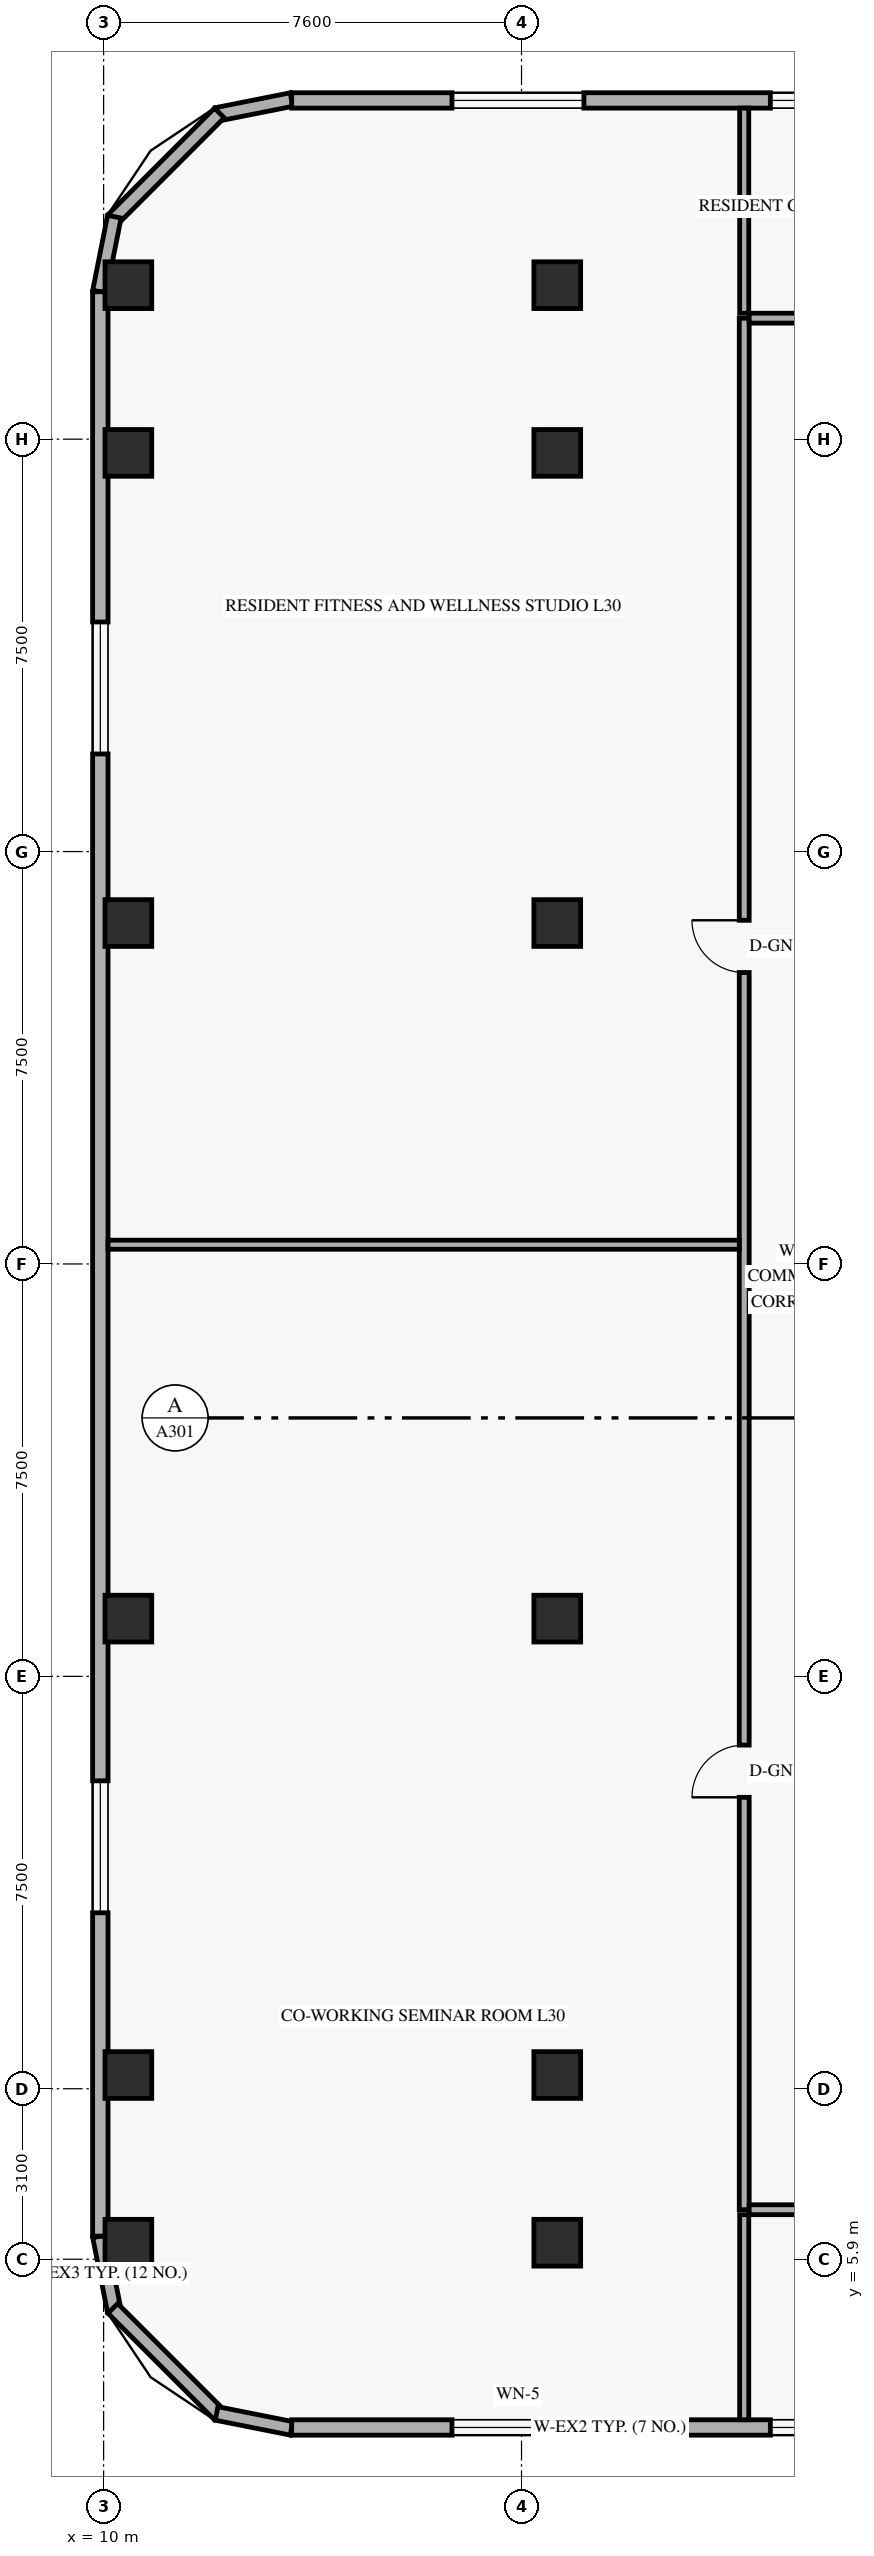
"""IFC4 building model, lengths in metres.
Left out: names, types, materials, properties, quantities, classifications, styles, units other than length and angle.
Written with IfcOpenShell. Run it as: python <this file> out.ifc"""

import sys

from ifc_helpers import new_model, si_unit, direction, frame, frame_2d, origin, origin_2d, place, context, subcontext, project, spatial, rectangle, extrude, element, fill, save


model = new_model("IFC4")
c1 = context("Model", 3, precision=1e-05, world=origin(), true_north=direction((0.0, 1.0)))
c2 = subcontext(c1, "Body", "Model", "MODEL_VIEW")
j1 = project(units=[si_unit("LENGTHUNIT", "METRE"), si_unit("PLANEANGLEUNIT", "RADIAN")], contexts=[c1])
p1 = place(None, origin())
s1 = spatial("IfcSite", under=j1, at=p1, CompositionType="ELEMENT")
p2 = place(p1, origin())
s2 = spatial("IfcBuilding", under=s1, at=p2, CompositionType="ELEMENT")
p3 = place(p2, frame((0.0, 0.0, 117.0)))
s3 = spatial("IfcBuildingStorey", under=s2, at=p3, CompositionType="ELEMENT", Elevation=117.0)
for number, where, z_axis, x_axis in (
    (1, (10.45, 6.2, 0.0), (0.0, 0.0, 1.0), (1.0, 0.0, 0.0)),
    (2, (10.45, 9.25, 0.0), (0.0, 0.0, 1.0), (1.0, 0.0, 0.0)),
    (3, (10.45, 17.55, 0.0), (0.0, 0.0, 1.0), (1.0, 0.0, 0.0)),
    (4, (10.45, 30.2, 0.0), (0.0, 0.0, 1.0), (1.0, 0.0, 0.0)),
    (5, (10.45, 38.75, 0.0), (0.0, 0.0, 1.0), (1.0, 0.0, 0.0)),
    (6, (10.45, 41.8, 0.0), (0.0, 0.0, 1.0), (1.0, 0.0, 0.0)),
    (7, (18.25, 6.2, 0.0), (0.0, 0.0, 1.0), (1.0, 0.0, 0.0)),
    (8, (18.25, 9.25, 0.0), (0.0, 0.0, 1.0), (1.0, 0.0, 0.0)),
    (9, (18.25, 17.55, 0.0), (0.0, 0.0, 1.0), (1.0, 0.0, 0.0)),
    (10, (18.25, 30.2, 0.0), (0.0, 0.0, 1.0), (1.0, 0.0, 0.0)),
    (11, (18.25, 38.75, 0.0), (0.0, 0.0, 1.0), (1.0, 0.0, 0.0)),
    (12, (18.25, 41.8, 0.0), (0.0, 0.0, 1.0), (1.0, 0.0, 0.0)),
):
    element("IfcColumn", number, at=place(p3, frame(where, z_axis=z_axis, x_axis=x_axis)), inside=s3, PredefinedType="COLUMN", context=c2, shape_type="SweptSolid", body=[
        extrude(rectangle(XDim=0.85, YDim=0.85, at=origin_2d()), origin(), (0.0, 0.0, 1.0), 4.2),
    ])
p4 = place(p3, frame((9.924, 6.316, 0.0), z_axis=(0.0, 0.0, 1.0), x_axis=(0.195000137217, -0.980803214965, 0.0)))
e13 = element("IfcWall", 13, at=p4, inside=s3, PredefinedType="SOLIDWALL", context=c2, shape_type="SweptSolid", body=[
    extrude(rectangle(XDim=1.388, YDim=0.25, at=frame_2d((0.694, 0.0))), origin(), (0.0, 0.0, 1.0), 3.96),
])
p5 = place(p3, frame((10.168, 5.005, 0.0), z_axis=(0.0, 0.0, 1.0), x_axis=(0.707151344399, -0.707062215165, 0.0)))
e14 = element("IfcWall", 14, at=p5, inside=s3, PredefinedType="SOLIDWALL", context=c2, shape_type="SweptSolid", body=[
    extrude(rectangle(XDim=2.739, YDim=0.25, at=frame_2d((1.37, 0.0))), origin(), (0.0, 0.0, 1.0), 3.96),
])
for number, where, z_axis, x_axis in (
    (15, (12.054, 3.095, 0.0), (0.0, 0.0, 1.0), (0.981, -0.195, 0.0)),
    (16, (13.417, 45.176, 0.0), (0.0, 0.0, 1.0), (-0.981, -0.195, 0.0)),
):
    element("IfcWall", number, at=place(p3, frame(where, z_axis=z_axis, x_axis=x_axis)), inside=s3, PredefinedType="SOLIDWALL", context=c2, shape_type="SweptSolid", body=[
        extrude(rectangle(XDim=1.389, YDim=0.25, at=frame_2d((0.694, 0.0))), origin(), (0.0, 0.0, 1.0), 3.96),
    ])
p6 = place(p3, frame((12.105, 44.932, 0.0), z_axis=(0.0, 0.0, 1.0), x_axis=(-0.707151344399, -0.707062215165, 0.0)))
e17 = element("IfcWall", 17, at=p6, inside=s3, PredefinedType="SOLIDWALL", context=c2, shape_type="SweptSolid", body=[
    extrude(rectangle(XDim=2.739, YDim=0.25, at=frame_2d((1.37, 0.0))), origin(), (0.0, 0.0, 1.0), 3.96),
])
p7 = place(p3, frame((10.195, 43.045, 0.0), z_axis=(0.0, 0.0, 1.0), x_axis=(-0.195000137217, -0.980803214965, 0.0)))
e18 = element("IfcWall", 18, at=p7, inside=s3, PredefinedType="SOLIDWALL", context=c2, shape_type="SweptSolid", body=[
    extrude(rectangle(XDim=1.388, YDim=0.25, at=frame_2d((0.694, 0.0))), origin(), (0.0, 0.0, 1.0), 3.96),
])
p8 = place(p3, frame((13.42, 2.84, 0.0), z_axis=(0.0, 0.0, 1.0), x_axis=(1.0, 0.0, 0.0)))
e19 = element("IfcWall", 19, at=p8, inside=s3, PredefinedType="SOLIDWALL", context=c2, shape_type="SweptSolid", body=[
    extrude(rectangle(XDim=11.58, YDim=0.28, at=frame_2d((5.79, 0.0))), origin(), (0.0, 0.0, 1.0), 3.96),
])
p9 = place(p8, frame((2.915, 0.0, 0.85)))
e20 = element("IfcOpeningElement", 20, at=p9, cuts=e19, PredefinedType="OPENING", context=c2, shape_type="SweptSolid", body=[
    extrude(rectangle(XDim=2.4, YDim=1.9, at=frame_2d((1.2, 0.95))), frame((0.0, 0.15, 0.0), z_axis=(0.0, -1.0, 0.0), x_axis=(1.0, 0.0, 0.0)), (0.0, 0.0, 1.0), 0.3),
])
p10 = place(p8, frame((8.705, 0.0, 0.85)))
e21 = element("IfcOpeningElement", 21, at=p10, cuts=e19, PredefinedType="OPENING", context=c2, shape_type="SweptSolid", body=[
    extrude(rectangle(XDim=2.4, YDim=1.9, at=frame_2d((1.2, 0.95))), frame((0.0, 0.15, 0.0), z_axis=(0.0, -1.0, 0.0), x_axis=(1.0, 0.0, 0.0)), (0.0, 0.0, 1.0), 0.3),
])
p11 = place(p3, frame((25.0, 45.16, 0.0), z_axis=(0.0, 0.0, 1.0), x_axis=(-1.0, 0.0, 0.0)))
e22 = element("IfcWall", 22, at=p11, inside=s3, PredefinedType="SOLIDWALL", context=c2, shape_type="SweptSolid", body=[
    extrude(rectangle(XDim=11.58, YDim=0.28, at=frame_2d((5.79, 0.0))), origin(), (0.0, 0.0, 1.0), 3.96),
])
p12 = place(p11, frame((6.265, 0.0, 0.85)))
e23 = element("IfcOpeningElement", 23, at=p12, cuts=e22, PredefinedType="OPENING", context=c2, shape_type="SweptSolid", body=[
    extrude(rectangle(XDim=2.4, YDim=1.9, at=frame_2d((1.2, 0.95))), frame((0.0, 0.15, 0.0), z_axis=(0.0, -1.0, 0.0), x_axis=(1.0, 0.0, 0.0)), (0.0, 0.0, 1.0), 0.3),
])
p13 = place(p11, frame((0.475, 0.0, 0.85)))
e24 = element("IfcOpeningElement", 24, at=p13, cuts=e22, PredefinedType="OPENING", context=c2, shape_type="SweptSolid", body=[
    extrude(rectangle(XDim=2.4, YDim=1.9, at=frame_2d((1.2, 0.95))), frame((0.0, 0.15, 0.0), z_axis=(0.0, -1.0, 0.0), x_axis=(1.0, 0.0, 0.0)), (0.0, 0.0, 1.0), 0.3),
])
p14 = place(p3, frame((9.94, 41.68, 0.0), z_axis=(0.0, 0.0, 1.0), x_axis=(0.0, -1.0, 0.0)))
e25 = element("IfcWall", 25, at=p14, inside=s3, PredefinedType="SOLIDWALL", context=c2, shape_type="SweptSolid", body=[
    extrude(rectangle(XDim=35.36, YDim=0.28, at=frame_2d((17.68, 0.0))), origin(), (0.0, 0.0, 1.0), 3.96),
])
p15 = place(p14, frame((27.08, 0.0, 0.85)))
e26 = element("IfcOpeningElement", 26, at=p15, cuts=e25, PredefinedType="OPENING", context=c2, shape_type="SweptSolid", body=[
    extrude(rectangle(XDim=2.4, YDim=1.9, at=frame_2d((1.2, 0.95))), frame((0.0, 0.15, 0.0), z_axis=(0.0, -1.0, 0.0), x_axis=(1.0, 0.0, 0.0)), (0.0, 0.0, 1.0), 0.3),
])
p16 = place(p14, frame((6.005, 0.0, 0.85)))
e27 = element("IfcOpeningElement", 27, at=p16, cuts=e25, PredefinedType="OPENING", context=c2, shape_type="SweptSolid", body=[
    extrude(rectangle(XDim=2.4, YDim=1.9, at=frame_2d((1.2, 0.95))), frame((0.0, 0.15, 0.0), z_axis=(0.0, -1.0, 0.0), x_axis=(1.0, 0.0, 0.0)), (0.0, 0.0, 1.0), 0.3),
])
p17 = place(p3, frame((21.65, 6.8, 0.0), z_axis=(0.0, 0.0, 1.0), x_axis=(0.0, 1.0, 0.0)))
e28 = element("IfcWall", 28, at=p17, inside=s3, PredefinedType="STANDARD", context=c2, shape_type="SweptSolid", body=[
    extrude(rectangle(XDim=34.4, YDim=0.18, at=frame_2d((17.2, 0.0))), origin(), (0.0, 0.0, 1.0), 3.331),
])
p18 = place(p17, frame((7.5, 0.0, 0.0)))
e29 = element("IfcOpeningElement", 29, at=p18, cuts=e28, PredefinedType="OPENING", context=c2, shape_type="SweptSolid", body=[
    extrude(rectangle(XDim=0.95, YDim=2.15, at=frame_2d((0.475, 1.075))), frame((0.0, 0.1, 0.0), z_axis=(0.0, -1.0, 0.0), x_axis=(1.0, 0.0, 0.0)), (0.0, 0.0, 1.0), 0.2),
])
p19 = place(p17, frame((22.5, 0.0, 0.0)))
e30 = element("IfcOpeningElement", 30, at=p19, cuts=e28, PredefinedType="OPENING", context=c2, shape_type="SweptSolid", body=[
    extrude(rectangle(XDim=0.95, YDim=2.15, at=frame_2d((0.475, 1.075))), frame((0.0, 0.1, 0.0), z_axis=(0.0, -1.0, 0.0), x_axis=(1.0, 0.0, 0.0)), (0.0, 0.0, 1.0), 0.2),
])
p20 = place(p3, frame((21.74, 6.8, 0.0), z_axis=(0.0, 0.0, 1.0), x_axis=(1.0, 0.0, 0.0)))
e31 = element("IfcWall", 31, at=p20, inside=s3, PredefinedType="STANDARD", context=c2, shape_type="SweptSolid", body=[
    extrude(rectangle(XDim=15.57, YDim=0.18, at=frame_2d((7.785, 0.0))), origin(), (0.0, 0.0, 1.0), 3.331),
])
p21 = place(p20, frame((5.41, 0.0, 0.0)))
e32 = element("IfcOpeningElement", 32, at=p21, cuts=e31, PredefinedType="OPENING", context=c2, shape_type="SweptSolid", body=[
    extrude(rectangle(XDim=0.95, YDim=2.15, at=frame_2d((0.475, 1.075))), frame((0.0, 0.1, 0.0), z_axis=(0.0, -1.0, 0.0), x_axis=(1.0, 0.0, 0.0)), (0.0, 0.0, 1.0), 0.2),
])
p22 = place(p3, frame((21.74, 41.2, 0.0), z_axis=(0.0, 0.0, 1.0), x_axis=(1.0, 0.0, 0.0)))
e33 = element("IfcWall", 33, at=p22, inside=s3, PredefinedType="STANDARD", context=c2, shape_type="SweptSolid", body=[
    extrude(rectangle(XDim=15.57, YDim=0.18, at=frame_2d((7.785, 0.0))), origin(), (0.0, 0.0, 1.0), 3.331),
])
p23 = place(p22, frame((5.41, 0.0, 0.0)))
e34 = element("IfcOpeningElement", 34, at=p23, cuts=e33, PredefinedType="OPENING", context=c2, shape_type="SweptSolid", body=[
    extrude(rectangle(XDim=0.95, YDim=2.15, at=frame_2d((0.475, 1.075))), frame((0.0, 0.1, 0.0), z_axis=(0.0, -1.0, 0.0), x_axis=(1.0, 0.0, 0.0)), (0.0, 0.0, 1.0), 0.2),
])
for number, where, z_axis, x_axis in (
    (35, (21.65, 2.98, 0.0), (0.0, 0.0, 1.0), (0.0, 1.0, 0.0)),
    (36, (21.65, 41.29, 0.0), (0.0, 0.0, 1.0), (0.0, 1.0, 0.0)),
):
    element("IfcWall", number, at=place(p3, frame(where, z_axis=z_axis, x_axis=x_axis)), inside=s3, PredefinedType="PARTITIONING", context=c2, shape_type="SweptSolid", body=[
        extrude(rectangle(XDim=3.73, YDim=0.165, at=frame_2d((1.865, 0.0))), origin(), (0.0, 0.0, 1.0), 3.409),
    ])
p24 = place(p3, frame((10.08, 24.35, 0.0), z_axis=(0.0, 0.0, 1.0), x_axis=(1.0, 0.0, 0.0)))
e37 = element("IfcWall", 37, at=p24, inside=s3, PredefinedType="PARTITIONING", context=c2, shape_type="SweptSolid", body=[
    extrude(rectangle(XDim=11.48, YDim=0.165, at=frame_2d((5.74, 0.0))), origin(), (0.0, 0.0, 1.0), 3.331),
])
p25 = place(p9, origin())
e38 = element("IfcWindow", 38, at=p25, inside=s3, PartitioningType="SINGLE_PANEL", PredefinedType="WINDOW", context=c2, shape_type="SweptSolid", body=[
    extrude(rectangle(XDim=2.4, YDim=1.9, at=frame_2d((1.2, 0.95))), frame((0.0, 0.03, 0.0), z_axis=(0.0, -1.0, 0.0), x_axis=(1.0, 0.0, 0.0)), (0.0, 0.0, 1.0), 0.06),
])
fill(e20, e38)
p26 = place(p10, origin())
e39 = element("IfcWindow", 39, at=p26, inside=s3, PartitioningType="SINGLE_PANEL", PredefinedType="WINDOW", context=c2, shape_type="SweptSolid", body=[
    extrude(rectangle(XDim=2.4, YDim=1.9, at=frame_2d((1.2, 0.95))), frame((0.0, 0.03, 0.0), z_axis=(0.0, -1.0, 0.0), x_axis=(1.0, 0.0, 0.0)), (0.0, 0.0, 1.0), 0.06),
])
fill(e21, e39)
p27 = place(p12, origin())
e40 = element("IfcWindow", 40, at=p27, inside=s3, PartitioningType="SINGLE_PANEL", PredefinedType="WINDOW", context=c2, shape_type="SweptSolid", body=[
    extrude(rectangle(XDim=2.4, YDim=1.9, at=frame_2d((1.2, 0.95))), frame((0.0, 0.03, 0.0), z_axis=(0.0, -1.0, 0.0), x_axis=(1.0, 0.0, 0.0)), (0.0, 0.0, 1.0), 0.06),
])
fill(e23, e40)
p28 = place(p13, origin())
e41 = element("IfcWindow", 41, at=p28, inside=s3, PartitioningType="SINGLE_PANEL", PredefinedType="WINDOW", context=c2, shape_type="SweptSolid", body=[
    extrude(rectangle(XDim=2.4, YDim=1.9, at=frame_2d((1.2, 0.95))), frame((0.0, 0.03, 0.0), z_axis=(0.0, -1.0, 0.0), x_axis=(1.0, 0.0, 0.0)), (0.0, 0.0, 1.0), 0.06),
])
fill(e24, e41)
p29 = place(p15, origin())
e42 = element("IfcWindow", 42, at=p29, inside=s3, PartitioningType="SINGLE_PANEL", PredefinedType="WINDOW", context=c2, shape_type="SweptSolid", body=[
    extrude(rectangle(XDim=2.4, YDim=1.9, at=frame_2d((1.2, 0.95))), frame((0.0, 0.03, 0.0), z_axis=(0.0, -1.0, 0.0), x_axis=(1.0, 0.0, 0.0)), (0.0, 0.0, 1.0), 0.06),
])
fill(e26, e42)
p30 = place(p16, origin())
e43 = element("IfcWindow", 43, at=p30, inside=s3, PartitioningType="SINGLE_PANEL", PredefinedType="WINDOW", context=c2, shape_type="SweptSolid", body=[
    extrude(rectangle(XDim=2.4, YDim=1.9, at=frame_2d((1.2, 0.95))), frame((0.0, 0.03, 0.0), z_axis=(0.0, -1.0, 0.0), x_axis=(1.0, 0.0, 0.0)), (0.0, 0.0, 1.0), 0.06),
])
fill(e27, e43)
p31 = place(p18, origin())
e44 = element("IfcDoor", 44, at=p31, inside=s3, OperationType="SINGLE_SWING_LEFT", PredefinedType="DOOR", context=c2, shape_type="SweptSolid", body=[
    extrude(rectangle(XDim=0.95, YDim=2.15, at=frame_2d((0.475, 1.075))), frame((0.0, 0.025, 0.0), z_axis=(0.0, -1.0, 0.0), x_axis=(1.0, 0.0, 0.0)), (0.0, 0.0, 1.0), 0.05),
])
fill(e29, e44)
p32 = place(p19, origin())
e45 = element("IfcDoor", 45, at=p32, inside=s3, OperationType="SINGLE_SWING_RIGHT", PredefinedType="DOOR", context=c2, shape_type="SweptSolid", body=[
    extrude(rectangle(XDim=0.95, YDim=2.15, at=frame_2d((0.475, 1.075))), frame((0.0, 0.025, 0.0), z_axis=(0.0, -1.0, 0.0), x_axis=(1.0, 0.0, 0.0)), (0.0, 0.0, 1.0), 0.05),
])
fill(e30, e45)
save(model, sys.argv[1])
